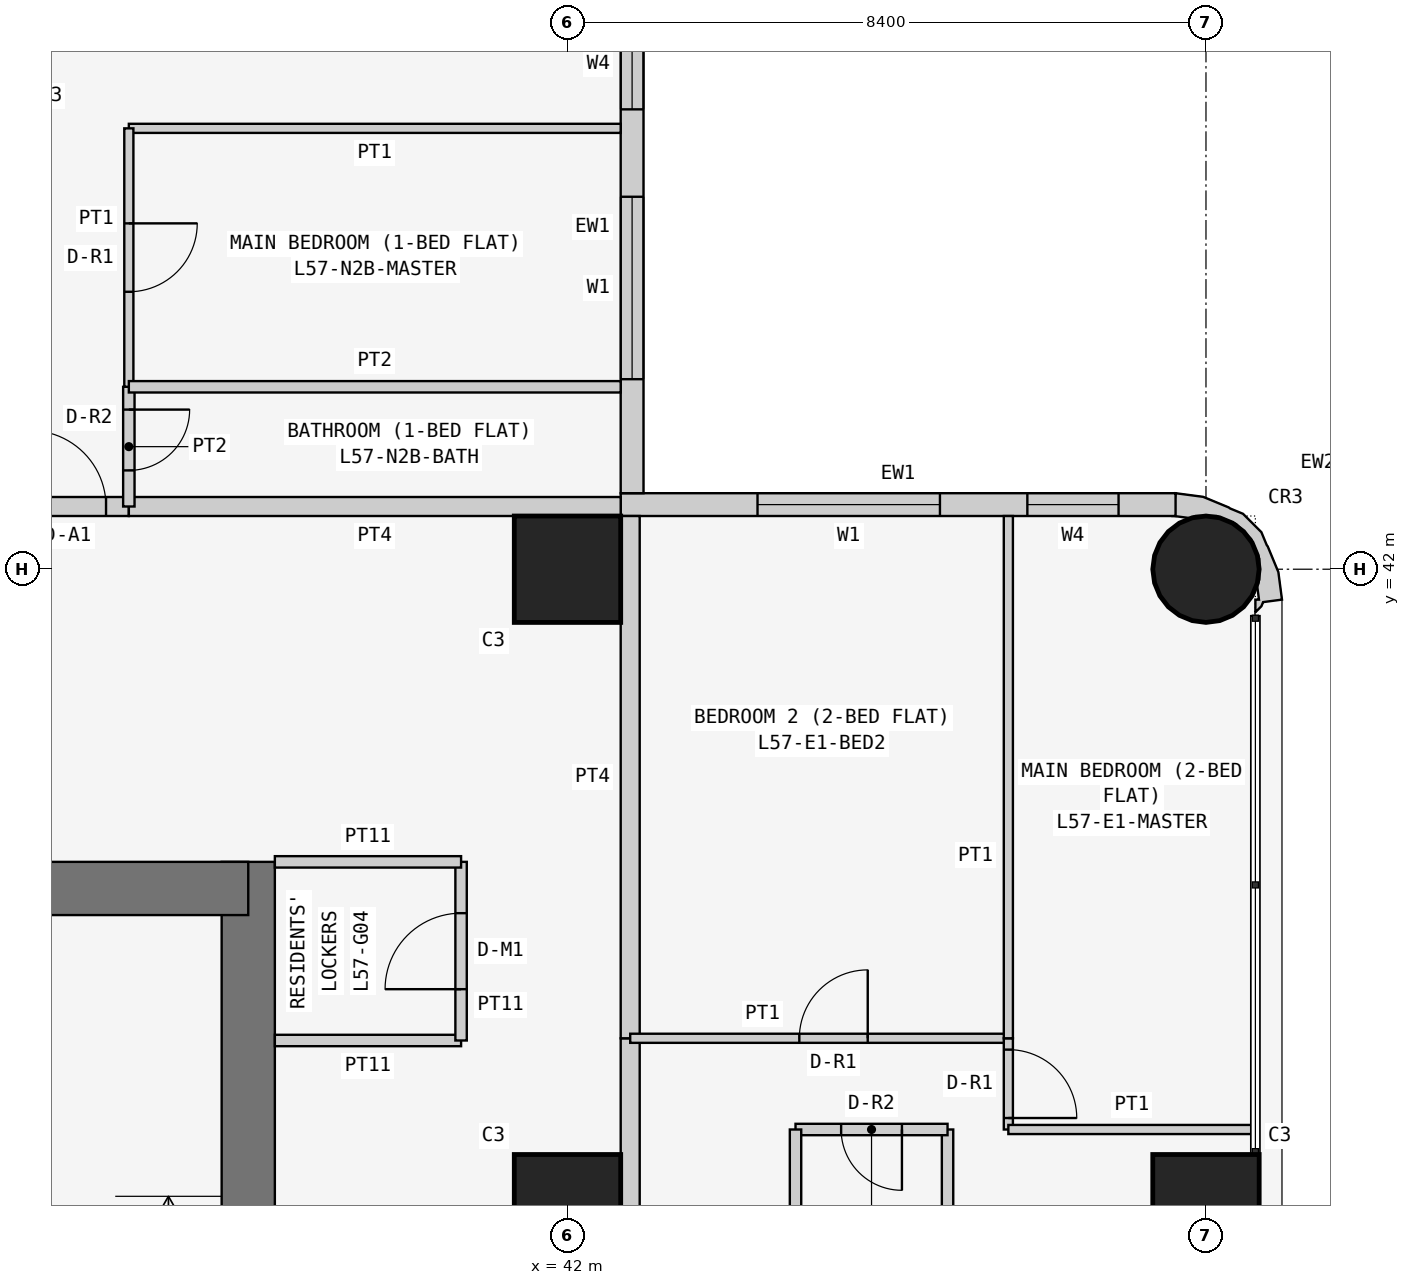
"""IFC4 building model, lengths in metres.
Left out: names, types, materials, properties, quantities, classifications, styles, units other than length and angle.
Written with IfcOpenShell. Run it as: python <this file> out.ifc"""

import sys

from ifc_helpers import new_model, si_unit, direction, frame, frame_2d, origin, origin_2d, place, context, subcontext, project, spatial, polyline, rectangle, circle, outline, extrude, element, fill, save


model = new_model("IFC4")
c1 = context("Model", 3, precision=1e-05, world=origin(), true_north=direction((0.0, 1.0)))
c2 = subcontext(c1, "Body", "Model", "MODEL_VIEW")
j1 = project(units=[si_unit("LENGTHUNIT", "METRE"), si_unit("PLANEANGLEUNIT", "RADIAN")], contexts=[c1])
p1 = place(None, origin())
s1 = spatial("IfcSite", under=j1, at=p1, CompositionType="ELEMENT")
p2 = place(p1, origin())
s2 = spatial("IfcBuilding", under=s1, at=p2, CompositionType="ELEMENT")
p3 = place(p2, frame((0.0, 0.0, 219.3)))
s3 = spatial("IfcBuildingStorey", under=s2, at=p3, CompositionType="ELEMENT", Elevation=219.3)
for number, where, z_axis, x_axis in (
    (1, (42.0, 33.6, 0.0), (0.0, 0.0, 1.0), (1.0, 0.0, 0.0)),
    (2, (42.0, 42.0, 0.0), (0.0, 0.0, 1.0), (1.0, 0.0, 0.0)),
    (3, (50.4, 33.6, 0.0), (0.0, 0.0, 1.0), (1.0, 0.0, 0.0)),
):
    element("IfcColumn", number, at=place(p3, frame(where, z_axis=z_axis, x_axis=x_axis)), inside=s3, PredefinedType="COLUMN", context=c2, shape_type="SweptSolid", body=[
        extrude(rectangle(XDim=1.4, YDim=1.4, at=origin_2d()), origin(), (0.0, 0.0, 1.0), 3.6),
    ])
p4 = place(p3, frame((50.4, 42.0, 0.0), z_axis=(0.0, 0.0, 1.0), x_axis=(1.0, 0.0, 0.0)))
e4 = element("IfcColumn", 4, at=p4, inside=s3, PredefinedType="COLUMN", context=c2, shape_type="SweptSolid", body=[
    extrude(circle(Radius=0.7, at=origin_2d()), origin(), (0.0, 0.0, 1.0), 3.6),
])
p5 = place(p3, frame((37.8, 21.0, 0.0), z_axis=(0.0, 0.0, 1.0), x_axis=(0.0, 1.0, 0.0)))
e5 = element("IfcWall", 5, at=p5, inside=s3, PredefinedType="SHEAR", context=c2, shape_type="SweptSolid", body=[
    extrude(rectangle(XDim=17.15, YDim=0.7, at=frame_2d((8.575, 0.0))), origin(), (0.0, 0.0, 1.0), 3.6),
])
p6 = place(p5, frame((5.2, 0.0, 0.0)))
e6 = element("IfcOpeningElement", 6, at=p6, cuts=e5, PredefinedType="OPENING", context=c2, shape_type="SweptSolid", body=[
    extrude(rectangle(XDim=1.2, YDim=2.1, at=frame_2d((0.6, 1.05))), frame((0.0, 0.36, 0.0), z_axis=(0.0, -1.0, 0.0), x_axis=(1.0, 0.0, 0.0)), (0.0, 0.0, 1.0), 0.72),
])
p7 = place(p3, frame((37.8, 37.8, 0.0), z_axis=(0.0, 0.0, 1.0), x_axis=(-1.0, 0.0, 0.0)))
e7 = element("IfcWall", 7, at=p7, inside=s3, PredefinedType="SHEAR", context=c2, shape_type="SweptSolid", body=[
    extrude(rectangle(XDim=17.15, YDim=0.7, at=frame_2d((8.575, 0.0))), origin(), (0.0, 0.0, 1.0), 3.6),
])
p8 = place(p3, frame((50.0, 42.85, 0.0), z_axis=(0.0, 0.0, 1.0), x_axis=(-1.0, 0.0, 0.0)))
e8 = element("IfcWall", 8, at=p8, inside=s3, PredefinedType="SOLIDWALL", context=c2, shape_type="SweptSolid", body=[
    extrude(rectangle(XDim=7.3, YDim=0.3, at=frame_2d((3.65, 0.0))), origin(), (0.0, 0.0, 1.0), 3.45),
])
p9 = place(p8, frame((3.1, 0.0, 0.9)))
e9 = element("IfcOpeningElement", 9, at=p9, cuts=e8, PredefinedType="OPENING", context=c2, shape_type="SweptSolid", body=[
    extrude(rectangle(XDim=2.4, YDim=1.5, at=frame_2d((1.2, 0.75))), frame((0.0, 0.16, 0.0), z_axis=(0.0, -1.0, 0.0), x_axis=(1.0, 0.0, 0.0)), (0.0, 0.0, 1.0), 0.32),
])
p10 = place(p8, frame((0.75, 0.0, 0.9)))
e10 = element("IfcOpeningElement", 10, at=p10, cuts=e8, PredefinedType="OPENING", context=c2, shape_type="SweptSolid", body=[
    extrude(rectangle(XDim=1.2, YDim=1.5, at=frame_2d((0.6, 0.75))), frame((0.0, 0.16, 0.0), z_axis=(0.0, -1.0, 0.0), x_axis=(1.0, 0.0, 0.0)), (0.0, 0.0, 1.0), 0.32),
])
p11 = place(p3, frame((42.85, 43.0, 0.0), z_axis=(0.0, 0.0, 1.0), x_axis=(0.0, 1.0, 0.0)))
e11 = element("IfcWall", 11, at=p11, inside=s3, PredefinedType="SOLIDWALL", context=c2, shape_type="SweptSolid", body=[
    extrude(rectangle(XDim=7.0, YDim=0.3, at=frame_2d((3.5, 0.0))), origin(), (0.0, 0.0, 1.0), 3.45),
])
p12 = place(p11, frame((1.5, 0.0, 0.9)))
e12 = element("IfcOpeningElement", 12, at=p12, cuts=e11, PredefinedType="OPENING", context=c2, shape_type="SweptSolid", body=[
    extrude(rectangle(XDim=2.4, YDim=1.5, at=frame_2d((1.2, 0.75))), frame((0.0, 0.16, 0.0), z_axis=(0.0, -1.0, 0.0), x_axis=(1.0, 0.0, 0.0)), (0.0, 0.0, 1.0), 0.32),
])
p13 = place(p11, frame((5.05, 0.0, 0.9)))
e13 = element("IfcOpeningElement", 13, at=p13, cuts=e11, PredefinedType="OPENING", context=c2, shape_type="SweptSolid", body=[
    extrude(rectangle(XDim=1.2, YDim=1.5, at=frame_2d((0.6, 0.75))), frame((0.0, 0.16, 0.0), z_axis=(0.0, -1.0, 0.0), x_axis=(1.0, 0.0, 0.0)), (0.0, 0.0, 1.0), 0.32),
])
p14 = place(p3, frame((50.988, 41.488, 0.0), z_axis=(0.0, 0.0, 1.0), x_axis=(0.898030234854, 0.439933741929, 0.0)))
e14 = element("IfcWall", 14, at=p14, inside=s3, PredefinedType="SOLIDWALL", context=c2, shape_type="SweptSolid", body=[
    extrude(outline(polyline([(0.138, -0.04), (0.182, -0.0), (0.419, -0.08), (0.536, 0.266), (0.559, 0.631), (0.555, 0.651), (0.566, 0.836), (0.455, 1.159), (0.333, 1.298), (0.324, 1.317), (0.082, 1.591), (-0.222, 1.793), (-0.39, 1.541), (-0.372, 1.532), (-0.195, 1.414), (-0.12, 1.41), (0.131, 1.287), (0.315, 1.078), (0.406, 0.814), (0.388, 0.536), (0.265, 0.285), (0.209, 0.235), (0.148, 0.053), (0.105, 0.074), (0.032, -0.076), (0.138, -0.04)])), origin(), (0.0, 0.0, 1.0), 3.45),
])
p15 = place(p3, frame((38.15, 35.8, 0.0), z_axis=(0.0, 0.0, 1.0), x_axis=(1.0, 0.0, 0.0)))
e15 = element("IfcWall", 15, at=p15, inside=s3, PredefinedType="PARTITIONING", context=c2, shape_type="SweptSolid", body=[
    extrude(rectangle(XDim=2.45, YDim=0.15, at=frame_2d((1.225, 0.0))), origin(), (0.0, 0.0, 1.0), 3.45),
])
p16 = place(p3, frame((40.6, 35.8, 0.0), z_axis=(0.0, 0.0, 1.0), x_axis=(0.0, 1.0, 0.0)))
e16 = element("IfcWall", 16, at=p16, inside=s3, PredefinedType="PARTITIONING", context=c2, shape_type="SweptSolid", body=[
    extrude(rectangle(XDim=2.35, YDim=0.15, at=frame_2d((1.175, 0.0))), origin(), (0.0, 0.0, 1.0), 3.45),
])
p17 = place(p16, frame((0.675, 0.0, 0.0)))
e17 = element("IfcOpeningElement", 17, at=p17, cuts=e16, PredefinedType="OPENING", context=c2, shape_type="SweptSolid", body=[
    extrude(rectangle(XDim=1.0, YDim=2.1, at=frame_2d((0.5, 1.05))), frame((0.0, 0.085, 0.0), z_axis=(0.0, -1.0, 0.0), x_axis=(1.0, 0.0, 0.0)), (0.0, 0.0, 1.0), 0.17),
])
p18 = place(p3, frame((40.6, 38.15, 0.0), z_axis=(0.0, 0.0, 1.0), x_axis=(-1.0, 0.0, 0.0)))
e18 = element("IfcWall", 18, at=p18, inside=s3, PredefinedType="PARTITIONING", context=c2, shape_type="SweptSolid", body=[
    extrude(rectangle(XDim=2.45, YDim=0.15, at=frame_2d((1.225, 0.0))), origin(), (0.0, 0.0, 1.0), 3.45),
])
p19 = place(p3, frame((34.629, 42.825, 0.0), z_axis=(0.0, 0.0, 1.0), x_axis=(1.0, 0.0, 0.0)))
e19 = element("IfcWall", 19, at=p19, inside=s3, PredefinedType="PARTITIONING", context=c2, shape_type="SweptSolid", body=[
    extrude(rectangle(XDim=1.6, YDim=0.25, at=frame_2d((0.8, 0.0))), origin(), (0.0, 0.0, 1.0), 3.45),
])
p20 = place(p19, frame((0.3, 0.0, 0.0)))
e20 = element("IfcOpeningElement", 20, at=p20, cuts=e19, PredefinedType="OPENING", context=c2, shape_type="SweptSolid", body=[
    extrude(rectangle(XDim=1.0, YDim=2.1, at=frame_2d((0.5, 1.05))), frame((0.0, 0.135, 0.0), z_axis=(0.0, -1.0, 0.0), x_axis=(1.0, 0.0, 0.0)), (0.0, 0.0, 1.0), 0.27),
])
p21 = place(p3, frame((36.229, 42.825, 0.0), z_axis=(0.0, 0.0, 1.0), x_axis=(1.0, 0.0, 0.0)))
e21 = element("IfcWall", 21, at=p21, inside=s3, PredefinedType="PARTITIONING", context=c2, shape_type="SweptSolid", body=[
    extrude(rectangle(XDim=6.471, YDim=0.25, at=frame_2d((3.235, 0.0))), origin(), (0.0, 0.0, 1.0), 3.45),
])
p22 = place(p3, frame((42.825, 35.829, 0.0), z_axis=(0.0, 0.0, 1.0), x_axis=(0.0, -1.0, 0.0)))
e22 = element("IfcWall", 22, at=p22, inside=s3, PredefinedType="PARTITIONING", context=c2, shape_type="SweptSolid", body=[
    extrude(rectangle(XDim=6.429, YDim=0.25, at=frame_2d((3.215, 0.0))), origin(), (0.0, 0.0, 1.0), 3.45),
])
p23 = place(p22, frame((4.929, 0.0, 0.0)))
e23 = element("IfcOpeningElement", 23, at=p23, cuts=e22, PredefinedType="OPENING", context=c2, shape_type="SweptSolid", body=[
    extrude(rectangle(XDim=1.0, YDim=2.1, at=frame_2d((0.5, 1.05))), frame((0.0, 0.135, 0.0), z_axis=(0.0, -1.0, 0.0), x_axis=(1.0, 0.0, 0.0)), (0.0, 0.0, 1.0), 0.27),
])
p24 = place(p3, frame((42.825, 42.7, 0.0), z_axis=(0.0, 0.0, 1.0), x_axis=(0.0, -1.0, 0.0)))
e24 = element("IfcWall", 24, at=p24, inside=s3, PredefinedType="PARTITIONING", context=c2, shape_type="SweptSolid", body=[
    extrude(rectangle(XDim=6.871, YDim=0.25, at=frame_2d((3.436, 0.0))), origin(), (0.0, 0.0, 1.0), 3.45),
])
p25 = place(p3, frame((36.229, 44.4, 0.0), z_axis=(0.0, 0.0, 1.0), x_axis=(0.0, -1.0, 0.0)))
e25 = element("IfcWall", 25, at=p25, inside=s3, PredefinedType="PARTITIONING", context=c2, shape_type="SweptSolid", body=[
    extrude(rectangle(XDim=1.575, YDim=0.15, at=frame_2d((0.788, 0.0))), origin(), (0.0, 0.0, 1.0), 3.45),
])
p26 = place(p25, frame((0.3, 0.0, 0.0)))
e26 = element("IfcOpeningElement", 26, at=p26, cuts=e25, PredefinedType="OPENING", context=c2, shape_type="SweptSolid", body=[
    extrude(rectangle(XDim=0.8, YDim=2.1, at=frame_2d((0.4, 1.05))), frame((0.0, 0.085, 0.0), z_axis=(0.0, -1.0, 0.0), x_axis=(1.0, 0.0, 0.0)), (0.0, 0.0, 1.0), 0.17),
])
p27 = place(p3, frame((42.7, 47.8, 0.0), z_axis=(0.0, 0.0, 1.0), x_axis=(-1.0, 0.0, 0.0)))
e27 = element("IfcWall", 27, at=p27, inside=s3, PredefinedType="PARTITIONING", context=c2, shape_type="SweptSolid", body=[
    extrude(rectangle(XDim=6.471, YDim=0.12, at=frame_2d((3.235, 0.0))), origin(), (0.0, 0.0, 1.0), 3.45),
])
p28 = place(p3, frame((36.229, 47.8, 0.0), z_axis=(0.0, 0.0, 1.0), x_axis=(0.0, -1.0, 0.0)))
e28 = element("IfcWall", 28, at=p28, inside=s3, PredefinedType="PARTITIONING", context=c2, shape_type="SweptSolid", body=[
    extrude(rectangle(XDim=3.4, YDim=0.12, at=frame_2d((1.7, 0.0))), origin(), (0.0, 0.0, 1.0), 3.45),
])
p29 = place(p28, frame((1.25, 0.0, 0.0)))
e29 = element("IfcOpeningElement", 29, at=p29, cuts=e28, PredefinedType="OPENING", context=c2, shape_type="SweptSolid", body=[
    extrude(rectangle(XDim=0.9, YDim=2.1, at=frame_2d((0.45, 1.05))), frame((0.0, 0.07, 0.0), z_axis=(0.0, -1.0, 0.0), x_axis=(1.0, 0.0, 0.0)), (0.0, 0.0, 1.0), 0.14),
])
p30 = place(p3, frame((36.229, 44.4, 0.0), z_axis=(0.0, 0.0, 1.0), x_axis=(1.0, 0.0, 0.0)))
e30 = element("IfcWall", 30, at=p30, inside=s3, PredefinedType="PARTITIONING", context=c2, shape_type="SweptSolid", body=[
    extrude(rectangle(XDim=6.471, YDim=0.15, at=frame_2d((3.235, 0.0))), origin(), (0.0, 0.0, 1.0), 3.45),
])
p31 = place(p3, frame((47.0, 29.4, 0.0), z_axis=(0.0, 0.0, 1.0), x_axis=(0.0, 1.0, 0.0)))
e31 = element("IfcWall", 31, at=p31, inside=s3, PredefinedType="PARTITIONING", context=c2, shape_type="SweptSolid", body=[
    extrude(rectangle(XDim=5.229, YDim=0.15, at=frame_2d((2.615, 0.0))), origin(), (0.0, 0.0, 1.0), 3.45),
])
p32 = place(p3, frame((47.0, 34.629, 0.0), z_axis=(0.0, 0.0, 1.0), x_axis=(-1.0, 0.0, 0.0)))
e32 = element("IfcWall", 32, at=p32, inside=s3, PredefinedType="PARTITIONING", context=c2, shape_type="SweptSolid", body=[
    extrude(rectangle(XDim=2.0, YDim=0.15, at=frame_2d((1.0, 0.0))), origin(), (0.0, 0.0, 1.0), 3.45),
])
p33 = place(p32, frame((0.6, 0.0, 0.0)))
e33 = element("IfcOpeningElement", 33, at=p33, cuts=e32, PredefinedType="OPENING", context=c2, shape_type="SweptSolid", body=[
    extrude(rectangle(XDim=0.8, YDim=2.1, at=frame_2d((0.4, 1.05))), frame((0.0, 0.085, 0.0), z_axis=(0.0, -1.0, 0.0), x_axis=(1.0, 0.0, 0.0)), (0.0, 0.0, 1.0), 0.17),
])
p34 = place(p3, frame((45.0, 34.629, 0.0), z_axis=(0.0, 0.0, 1.0), x_axis=(0.0, -1.0, 0.0)))
e34 = element("IfcWall", 34, at=p34, inside=s3, PredefinedType="PARTITIONING", context=c2, shape_type="SweptSolid", body=[
    extrude(rectangle(XDim=5.229, YDim=0.15, at=frame_2d((2.615, 0.0))), origin(), (0.0, 0.0, 1.0), 3.45),
])
p35 = place(p3, frame((42.825, 35.829, 0.0), z_axis=(0.0, 0.0, 1.0), x_axis=(1.0, 0.0, 0.0)))
e35 = element("IfcWall", 35, at=p35, inside=s3, PredefinedType="PARTITIONING", context=c2, shape_type="SweptSolid", body=[
    extrude(rectangle(XDim=4.975, YDim=0.12, at=frame_2d((2.488, 0.0))), origin(), (0.0, 0.0, 1.0), 3.45),
])
p36 = place(p35, frame((2.225, 0.0, 0.0)))
e36 = element("IfcOpeningElement", 36, at=p36, cuts=e35, PredefinedType="OPENING", context=c2, shape_type="SweptSolid", body=[
    extrude(rectangle(XDim=0.9, YDim=2.1, at=frame_2d((0.45, 1.05))), frame((0.0, 0.07, 0.0), z_axis=(0.0, -1.0, 0.0), x_axis=(1.0, 0.0, 0.0)), (0.0, 0.0, 1.0), 0.14),
])
p37 = place(p3, frame((47.8, 35.829, 0.0), z_axis=(0.0, 0.0, 1.0), x_axis=(0.0, -1.0, 0.0)))
e37 = element("IfcWall", 37, at=p37, inside=s3, PredefinedType="PARTITIONING", context=c2, shape_type="SweptSolid", body=[
    extrude(rectangle(XDim=1.2, YDim=0.12, at=frame_2d((0.6, 0.0))), origin(), (0.0, 0.0, 1.0), 3.45),
])
p38 = place(p37, frame((0.149, 0.0, 0.0)))
e38 = element("IfcOpeningElement", 38, at=p38, cuts=e37, PredefinedType="OPENING", context=c2, shape_type="SweptSolid", body=[
    extrude(rectangle(XDim=0.9, YDim=2.1, at=frame_2d((0.45, 1.05))), frame((0.0, 0.07, 0.0), z_axis=(0.0, -1.0, 0.0), x_axis=(1.0, 0.0, 0.0)), (0.0, 0.0, 1.0), 0.14),
])
p39 = place(p3, frame((47.8, 34.629, 0.0), z_axis=(0.0, 0.0, 1.0), x_axis=(1.0, 0.0, 0.0)))
e39 = element("IfcWall", 39, at=p39, inside=s3, PredefinedType="PARTITIONING", context=c2, shape_type="SweptSolid", body=[
    extrude(rectangle(XDim=3.25, YDim=0.12, at=frame_2d((1.625, 0.0))), origin(), (0.0, 0.0, 1.0), 3.45),
])
p40 = place(p3, frame((47.8, 35.829, 0.0), z_axis=(0.0, 0.0, 1.0), x_axis=(0.0, 1.0, 0.0)))
e40 = element("IfcWall", 40, at=p40, inside=s3, PredefinedType="PARTITIONING", context=c2, shape_type="SweptSolid", body=[
    extrude(rectangle(XDim=6.871, YDim=0.12, at=frame_2d((3.436, 0.0))), origin(), (0.0, 0.0, 1.0), 3.45),
])
p41 = place(p12, origin())
e41 = element("IfcWindow", 41, at=p41, inside=s3, PartitioningType="SINGLE_PANEL", PredefinedType="WINDOW", context=c2, shape_type="SweptSolid", body=[
    extrude(rectangle(XDim=2.4, YDim=1.5, at=frame_2d((1.2, 0.75))), frame((0.0, 0.03, 0.0), z_axis=(0.0, -1.0, 0.0), x_axis=(1.0, 0.0, 0.0)), (0.0, 0.0, 1.0), 0.06),
])
fill(e12, e41)
p42 = place(p13, origin())
e42 = element("IfcWindow", 42, at=p42, inside=s3, PartitioningType="SINGLE_PANEL", PredefinedType="WINDOW", context=c2, shape_type="SweptSolid", body=[
    extrude(rectangle(XDim=1.2, YDim=1.5, at=frame_2d((0.6, 0.75))), frame((0.0, 0.03, 0.0), z_axis=(0.0, -1.0, 0.0), x_axis=(1.0, 0.0, 0.0)), (0.0, 0.0, 1.0), 0.06),
])
fill(e13, e42)
p43 = place(p9, origin())
e43 = element("IfcWindow", 43, at=p43, inside=s3, PartitioningType="SINGLE_PANEL", PredefinedType="WINDOW", context=c2, shape_type="SweptSolid", body=[
    extrude(rectangle(XDim=2.4, YDim=1.5, at=frame_2d((1.2, 0.75))), frame((0.0, 0.03, 0.0), z_axis=(0.0, -1.0, 0.0), x_axis=(1.0, 0.0, 0.0)), (0.0, 0.0, 1.0), 0.06),
])
fill(e9, e43)
p44 = place(p10, origin())
e44 = element("IfcWindow", 44, at=p44, inside=s3, PartitioningType="SINGLE_PANEL", PredefinedType="WINDOW", context=c2, shape_type="SweptSolid", body=[
    extrude(rectangle(XDim=1.2, YDim=1.5, at=frame_2d((0.6, 0.75))), frame((0.0, 0.03, 0.0), z_axis=(0.0, -1.0, 0.0), x_axis=(1.0, 0.0, 0.0)), (0.0, 0.0, 1.0), 0.06),
])
fill(e10, e44)
p45 = place(p17, origin())
e45 = element("IfcDoor", 45, at=p45, inside=s3, OperationType="SINGLE_SWING_LEFT", PredefinedType="DOOR", context=c2, shape_type="SweptSolid", body=[
    extrude(rectangle(XDim=1.0, YDim=2.1, at=frame_2d((0.5, 1.05))), frame((0.0, 0.025, 0.0), z_axis=(0.0, -1.0, 0.0), x_axis=(1.0, 0.0, 0.0)), (0.0, 0.0, 1.0), 0.05),
])
fill(e17, e45)
p46 = place(p20, origin())
e46 = element("IfcDoor", 46, at=p46, inside=s3, OperationType="SINGLE_SWING_LEFT", PredefinedType="DOOR", context=c2, shape_type="SweptSolid", body=[
    extrude(rectangle(XDim=1.0, YDim=2.1, at=frame_2d((0.5, 1.05))), frame((0.0, 0.025, 0.0), z_axis=(0.0, -1.0, 0.0), x_axis=(1.0, 0.0, 0.0)), (0.0, 0.0, 1.0), 0.05),
])
fill(e20, e46)
p47 = place(p26, origin())
e47 = element("IfcDoor", 47, at=p47, inside=s3, OperationType="SINGLE_SWING_LEFT", PredefinedType="DOOR", context=c2, shape_type="SweptSolid", body=[
    extrude(rectangle(XDim=0.8, YDim=2.1, at=frame_2d((0.4, 1.05))), frame((0.0, 0.025, 0.0), z_axis=(0.0, -1.0, 0.0), x_axis=(1.0, 0.0, 0.0)), (0.0, 0.0, 1.0), 0.05),
])
fill(e26, e47)
p48 = place(p29, origin())
e48 = element("IfcDoor", 48, at=p48, inside=s3, OperationType="SINGLE_SWING_LEFT", PredefinedType="DOOR", context=c2, shape_type="SweptSolid", body=[
    extrude(rectangle(XDim=0.9, YDim=2.1, at=frame_2d((0.45, 1.05))), frame((0.0, 0.025, 0.0), z_axis=(0.0, -1.0, 0.0), x_axis=(1.0, 0.0, 0.0)), (0.0, 0.0, 1.0), 0.05),
])
fill(e29, e48)
p49 = place(p33, origin())
e49 = element("IfcDoor", 49, at=p49, inside=s3, OperationType="SINGLE_SWING_LEFT", PredefinedType="DOOR", context=c2, shape_type="SweptSolid", body=[
    extrude(rectangle(XDim=0.8, YDim=2.1, at=frame_2d((0.4, 1.05))), frame((0.0, 0.025, 0.0), z_axis=(0.0, -1.0, 0.0), x_axis=(1.0, 0.0, 0.0)), (0.0, 0.0, 1.0), 0.05),
])
fill(e33, e49)
p50 = place(p36, origin())
e50 = element("IfcDoor", 50, at=p50, inside=s3, OperationType="SINGLE_SWING_RIGHT", PredefinedType="DOOR", context=c2, shape_type="SweptSolid", body=[
    extrude(rectangle(XDim=0.9, YDim=2.1, at=frame_2d((0.45, 1.05))), frame((0.0, 0.025, 0.0), z_axis=(0.0, -1.0, 0.0), x_axis=(1.0, 0.0, 0.0)), (0.0, 0.0, 1.0), 0.05),
])
fill(e36, e50)
p51 = place(p38, origin())
e51 = element("IfcDoor", 51, at=p51, inside=s3, OperationType="SINGLE_SWING_RIGHT", PredefinedType="DOOR", context=c2, shape_type="SweptSolid", body=[
    extrude(rectangle(XDim=0.9, YDim=2.1, at=frame_2d((0.45, 1.05))), frame((0.0, 0.025, 0.0), z_axis=(0.0, -1.0, 0.0), x_axis=(1.0, 0.0, 0.0)), (0.0, 0.0, 1.0), 0.05),
])
fill(e38, e51)
save(model, sys.argv[1])
